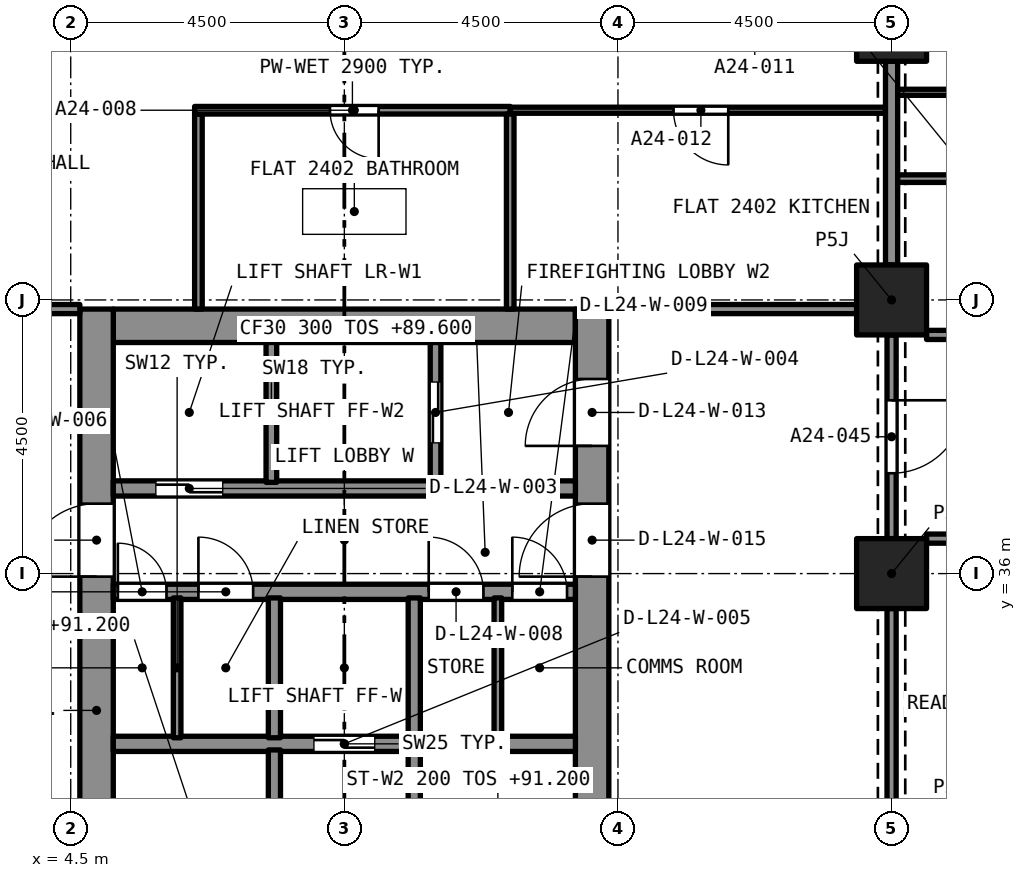
"""IFC4 building model, lengths in metres.
Left out: names, types, materials, properties, quantities, classifications, styles, units other than length and angle.
Written with IfcOpenShell. Run it as: python <this file> out.ifc"""

import sys

from ifc_helpers import new_model, si_unit, direction, frame, frame_2d, origin, origin_2d, place, context, subcontext, project, spatial, rectangle, extrude, element, fill, save


model = new_model("IFC4")
c1 = context("Model", 3, precision=1e-05, world=origin(), true_north=direction((0.0, 1.0)))
c2 = subcontext(c1, "Body", "Model", "MODEL_VIEW")
j1 = project(units=[si_unit("LENGTHUNIT", "METRE"), si_unit("PLANEANGLEUNIT", "RADIAN")], contexts=[c1])
p1 = place(None, origin())
s1 = spatial("IfcSite", under=j1, at=p1, CompositionType="ELEMENT")
p2 = place(p1, origin())
s2 = spatial("IfcBuilding", under=s1, at=p2, CompositionType="ELEMENT")
p3 = place(p2, frame((0.0, 0.0, 89.6)))
s3 = spatial("IfcBuildingStorey", under=s2, at=p3, CompositionType="ELEMENT", Elevation=89.6)
for number, where, z_axis, x_axis in (
    (1, (18.0, 36.0, 0.0), (0.0, 0.0, 1.0), (1.0, 0.0, 0.0)),
    (2, (18.0, 40.5, 0.0), (0.0, 0.0, 1.0), (1.0, 0.0, 0.0)),
    (3, (18.0, 45.0, 0.0), (0.0, 0.0, 1.0), (1.0, 0.0, 0.0)),
):
    element("IfcColumn", number, at=place(p3, frame(where, z_axis=z_axis, x_axis=x_axis)), inside=s3, PredefinedType="COLUMN", context=c2, shape_type="SweptSolid", body=[
        extrude(rectangle(XDim=1.15, YDim=1.15, at=origin_2d()), origin(), (0.0, 0.0, 1.0), 3.2),
    ])
p4 = place(p3, frame((5.2, 40.075, 0.0), z_axis=(0.0, 0.0, 1.0), x_axis=(1.0, 0.0, 0.0)))
e4 = element("IfcWall", 4, at=p4, inside=s3, PredefinedType="SOLIDWALL", context=c2, shape_type="SweptSolid", body=[
    extrude(rectangle(XDim=7.6, YDim=0.55, at=frame_2d((3.8, 0.0))), origin(), (0.0, 0.0, 1.0), 3.2),
])
p5 = place(p3, frame((4.925, 27.15, 0.0), z_axis=(0.0, 0.0, 1.0), x_axis=(0.0, 1.0, 0.0)))
e5 = element("IfcWall", 5, at=p5, inside=s3, PredefinedType="SOLIDWALL", context=c2, shape_type="SweptSolid", body=[
    extrude(rectangle(XDim=13.2, YDim=0.55, at=frame_2d((6.6, 0.0))), origin(), (0.0, 0.0, 1.0), 3.2),
])
p6 = place(p5, frame((8.8, 0.0, 0.0)))
e6 = element("IfcOpeningElement", 6, at=p6, cuts=e5, PredefinedType="OPENING", context=c2, shape_type="SweptSolid", body=[
    extrude(rectangle(XDim=1.2, YDim=2.1, at=frame_2d((0.6, 1.05))), frame((0.0, 0.285, 0.0), z_axis=(0.0, -1.0, 0.0), x_axis=(1.0, 0.0, 0.0)), (0.0, 0.0, 1.0), 0.57),
])
p7 = place(p3, frame((13.075, 27.15, 0.0), z_axis=(0.0, 0.0, 1.0), x_axis=(0.0, 1.0, 0.0)))
e7 = element("IfcWall", 7, at=p7, inside=s3, PredefinedType="SOLIDWALL", context=c2, shape_type="SweptSolid", body=[
    extrude(rectangle(XDim=13.2, YDim=0.55, at=frame_2d((6.6, 0.0))), origin(), (0.0, 0.0, 1.0), 3.2),
])
p8 = place(p7, frame((10.95, 0.0, 0.0)))
e8 = element("IfcOpeningElement", 8, at=p8, cuts=e7, PredefinedType="OPENING", context=c2, shape_type="SweptSolid", body=[
    extrude(rectangle(XDim=1.1, YDim=2.1, at=frame_2d((0.55, 1.05))), frame((0.0, 0.285, 0.0), z_axis=(0.0, -1.0, 0.0), x_axis=(1.0, 0.0, 0.0)), (0.0, 0.0, 1.0), 0.57),
])
p9 = place(p7, frame((8.8, 0.0, 0.0)))
e9 = element("IfcOpeningElement", 9, at=p9, cuts=e7, PredefinedType="OPENING", context=c2, shape_type="SweptSolid", body=[
    extrude(rectangle(XDim=1.2, YDim=2.1, at=frame_2d((0.6, 1.05))), frame((0.0, 0.285, 0.0), z_axis=(0.0, -1.0, 0.0), x_axis=(1.0, 0.0, 0.0)), (0.0, 0.0, 1.0), 0.57),
])
p10 = place(p3, frame((6.6, 40.35, 0.0), z_axis=(0.0, 0.0, 1.0), x_axis=(0.0, 1.0, 0.0)))
e10 = element("IfcWall", 10, at=p10, inside=s3, PredefinedType="PARTITIONING", context=c2, shape_type="SweptSolid", body=[
    extrude(rectangle(XDim=3.208, YDim=0.125, at=frame_2d((1.604, 0.0))), origin(), (0.0, 0.0, 1.0), 2.9),
])
p11 = place(p3, frame((11.728, 43.62, 0.0), z_axis=(0.0, 0.0, 1.0), x_axis=(-1.0, 0.0, 0.0)))
e11 = element("IfcWall", 11, at=p11, inside=s3, PredefinedType="PARTITIONING", context=c2, shape_type="SweptSolid", body=[
    extrude(rectangle(XDim=5.19, YDim=0.125, at=frame_2d((2.595, 0.0))), origin(), (0.0, 0.0, 1.0), 2.9),
])
p12 = place(p11, frame((2.164, 0.0, 0.0)))
e12 = element("IfcOpeningElement", 12, at=p12, cuts=e11, PredefinedType="OPENING", context=c2, shape_type="SweptSolid", body=[
    extrude(rectangle(XDim=0.8, YDim=2.1, at=frame_2d((0.4, 1.05))), frame((0.0, 0.073, 0.0), z_axis=(0.0, -1.0, 0.0), x_axis=(1.0, 0.0, 0.0)), (0.0, 0.0, 1.0), 0.145),
])
p13 = place(p3, frame((11.728, 40.35, 0.0), z_axis=(0.0, 0.0, 1.0), x_axis=(0.0, 1.0, 0.0)))
e13 = element("IfcWall", 13, at=p13, inside=s3, PredefinedType="PARTITIONING", context=c2, shape_type="SweptSolid", body=[
    extrude(rectangle(XDim=3.208, YDim=0.125, at=frame_2d((1.604, 0.0))), origin(), (0.0, 0.0, 1.0), 2.9),
])
p14 = place(p3, frame((17.9, 43.62, 0.0), z_axis=(0.0, 0.0, 1.0), x_axis=(-1.0, 0.0, 0.0)))
e14 = element("IfcWall", 14, at=p14, inside=s3, PredefinedType="PARTITIONING", context=c2, shape_type="SweptSolid", body=[
    extrude(rectangle(XDim=6.172, YDim=0.1, at=frame_2d((3.086, 0.0))), origin(), (0.0, 0.0, 1.0), 2.9),
])
p15 = place(p14, frame((2.586, 0.0, 0.0)))
e15 = element("IfcOpeningElement", 15, at=p15, cuts=e14, PredefinedType="OPENING", context=c2, shape_type="SweptSolid", body=[
    extrude(rectangle(XDim=0.9, YDim=2.1, at=frame_2d((0.45, 1.05))), frame((0.0, 0.06, 0.0), z_axis=(0.0, -1.0, 0.0), x_axis=(1.0, 0.0, 0.0)), (0.0, 0.0, 1.0), 0.12),
])
p16 = place(p3, frame((0.575, 40.35, 0.0), z_axis=(0.0, 0.0, 1.0), x_axis=(1.0, 0.0, 0.0)))
e16 = element("IfcWall", 16, at=p16, inside=s3, PredefinedType="PARTITIONING", context=c2, shape_type="SweptSolid", body=[
    extrude(rectangle(XDim=4.075, YDim=0.15, at=frame_2d((2.038, 0.0))), origin(), (0.0, 0.0, 1.0), 2.9),
])
p17 = place(p16, frame((1.175, 0.0, 0.0)))
e17 = element("IfcOpeningElement", 17, at=p17, cuts=e16, PredefinedType="OPENING", context=c2, shape_type="SweptSolid", body=[
    extrude(rectangle(XDim=1.0, YDim=2.1, at=frame_2d((0.5, 1.05))), frame((0.0, 0.085, 0.0), z_axis=(0.0, -1.0, 0.0), x_axis=(1.0, 0.0, 0.0)), (0.0, 0.0, 1.0), 0.17),
])
p18 = place(p3, frame((18.0, 41.075, 0.0), z_axis=(0.0, 0.0, 1.0), x_axis=(0.0, 1.0, 0.0)))
e18 = element("IfcWall", 18, at=p18, inside=s3, PredefinedType="PARTITIONING", context=c2, shape_type="SweptSolid", body=[
    extrude(rectangle(XDim=3.35, YDim=0.2, at=frame_2d((1.675, 0.0))), origin(), (0.0, 0.0, 1.0), 2.38),
])
p19 = place(p3, frame((13.35, 40.35, 0.0), z_axis=(0.0, 0.0, 1.0), x_axis=(1.0, 0.0, 0.0)))
e19 = element("IfcWall", 19, at=p19, inside=s3, PredefinedType="PARTITIONING", context=c2, shape_type="SweptSolid", body=[
    extrude(rectangle(XDim=4.075, YDim=0.15, at=frame_2d((2.038, 0.0))), origin(), (0.0, 0.0, 1.0), 2.9),
])
p20 = place(p3, frame((20.762, 42.495, 0.0), z_axis=(0.0, 0.0, 1.0), x_axis=(-1.0, 0.0, 0.0)))
e20 = element("IfcWall", 20, at=p20, inside=s3, PredefinedType="PARTITIONING", context=c2, shape_type="SweptSolid", body=[
    extrude(rectangle(XDim=2.662, YDim=0.125, at=frame_2d((1.331, 0.0))), origin(), (0.0, 0.0, 1.0), 2.75),
])
p21 = place(p20, frame((1.012, 0.0, 0.0)))
e21 = element("IfcOpeningElement", 21, at=p21, cuts=e20, PredefinedType="OPENING", context=c2, shape_type="SweptSolid", body=[
    extrude(rectangle(XDim=0.8, YDim=2.1, at=frame_2d((0.4, 1.05))), frame((0.0, 0.073, 0.0), z_axis=(0.0, -1.0, 0.0), x_axis=(1.0, 0.0, 0.0)), (0.0, 0.0, 1.0), 0.145),
])
p22 = place(p3, frame((18.575, 39.925, 0.0), z_axis=(0.0, 0.0, 1.0), x_axis=(1.0, 0.0, 0.0)))
e22 = element("IfcWall", 22, at=p22, inside=s3, PredefinedType="PARTITIONING", context=c2, shape_type="SweptSolid", body=[
    extrude(rectangle(XDim=2.125, YDim=0.15, at=frame_2d((1.062, 0.0))), origin(), (0.0, 0.0, 1.0), 2.75),
])
p23 = place(p3, frame((18.1, 43.915, 0.0), z_axis=(0.0, 0.0, 1.0), x_axis=(1.0, 0.0, 0.0)))
e23 = element("IfcWall", 23, at=p23, inside=s3, PredefinedType="PARTITIONING", context=c2, shape_type="SweptSolid", body=[
    extrude(rectangle(XDim=4.4, YDim=0.1, at=frame_2d((2.2, 0.0))), origin(), (0.0, 0.0, 1.0), 2.75),
])
p24 = place(p23, frame((1.65, 0.0, 0.0)))
e24 = element("IfcOpeningElement", 24, at=p24, cuts=e23, PredefinedType="OPENING", context=c2, shape_type="SweptSolid", body=[
    extrude(rectangle(XDim=1.0, YDim=2.1, at=frame_2d((0.5, 1.05))), frame((0.0, 0.06, 0.0), z_axis=(0.0, -1.0, 0.0), x_axis=(1.0, 0.0, 0.0)), (0.0, 0.0, 1.0), 0.12),
])
p25 = place(p3, frame((22.5, 36.575, 0.0), z_axis=(0.0, 0.0, 1.0), x_axis=(-1.0, 0.0, 0.0)))
e25 = element("IfcWall", 25, at=p25, inside=s3, PredefinedType="PARTITIONING", context=c2, shape_type="SweptSolid", body=[
    extrude(rectangle(XDim=3.925, YDim=0.15, at=frame_2d((1.962, 0.0))), origin(), (0.0, 0.0, 1.0), 2.75),
])
p26 = place(p25, frame((1.75, 0.0, 0.0)))
e26 = element("IfcOpeningElement", 26, at=p26, cuts=e25, PredefinedType="OPENING", context=c2, shape_type="SweptSolid", body=[
    extrude(rectangle(XDim=1.0, YDim=2.1, at=frame_2d((0.5, 1.05))), frame((0.0, 0.085, 0.0), z_axis=(0.0, -1.0, 0.0), x_axis=(1.0, 0.0, 0.0)), (0.0, 0.0, 1.0), 0.17),
])
p27 = place(p3, frame((18.0, 39.925, 0.0), z_axis=(0.0, 0.0, 1.0), x_axis=(0.0, -1.0, 0.0)))
e27 = element("IfcWall", 27, at=p27, inside=s3, PredefinedType="PARTITIONING", context=c2, shape_type="SweptSolid", body=[
    extrude(rectangle(XDim=3.35, YDim=0.15, at=frame_2d((1.675, 0.0))), origin(), (0.0, 0.0, 1.0), 2.38),
])
p28 = place(p27, frame((1.075, 0.0, 0.0)))
e28 = element("IfcOpeningElement", 28, at=p28, cuts=e27, PredefinedType="OPENING", context=c2, shape_type="SweptSolid", body=[
    extrude(rectangle(XDim=1.2, YDim=2.1, at=frame_2d((0.6, 1.05))), frame((0.0, 0.085, 0.0), z_axis=(0.0, -1.0, 0.0), x_axis=(1.0, 0.0, 0.0)), (0.0, 0.0, 1.0), 0.17),
])
p29 = place(p3, frame((18.0, 32.075, 0.0), z_axis=(0.0, 0.0, 1.0), x_axis=(0.0, 1.0, 0.0)))
e29 = element("IfcWall", 29, at=p29, inside=s3, PredefinedType="PARTITIONING", context=c2, shape_type="SweptSolid", body=[
    extrude(rectangle(XDim=3.35, YDim=0.15, at=frame_2d((1.675, 0.0))), origin(), (0.0, 0.0, 1.0), 2.38),
])
p30 = place(p3, frame((5.2, 33.2, 0.0), z_axis=(0.0, 0.0, 1.0), x_axis=(1.0, 0.0, 0.0)))
e30 = element("IfcWall", 30, at=p30, inside=s3, PredefinedType="SOLIDWALL", context=c2, shape_type="SweptSolid", body=[
    extrude(rectangle(XDim=7.6, YDim=0.25, at=frame_2d((3.8, 0.0))), origin(), (0.0, 0.0, 1.0), 2.9),
])
p31 = place(p30, frame((3.3, 0.0, 0.0)))
e31 = element("IfcOpeningElement", 31, at=p31, cuts=e30, PredefinedType="OPENING", context=c2, shape_type="SweptSolid", body=[
    extrude(rectangle(XDim=1.0, YDim=2.1, at=frame_2d((0.5, 1.05))), frame((0.0, 0.135, 0.0), z_axis=(0.0, -1.0, 0.0), x_axis=(1.0, 0.0, 0.0)), (0.0, 0.0, 1.0), 0.27),
])
p32 = place(p3, frame((5.2, 35.7, 0.0), z_axis=(0.0, 0.0, 1.0), x_axis=(1.0, 0.0, 0.0)))
e32 = element("IfcWall", 32, at=p32, inside=s3, PredefinedType="SOLIDWALL", context=c2, shape_type="SweptSolid", body=[
    extrude(rectangle(XDim=7.6, YDim=0.25, at=frame_2d((3.8, 0.0))), origin(), (0.0, 0.0, 1.0), 2.9),
])
p33 = place(p32, frame((0.075, 0.0, 0.0)))
e33 = element("IfcOpeningElement", 33, at=p33, cuts=e32, PredefinedType="OPENING", context=c2, shape_type="SweptSolid", body=[
    extrude(rectangle(XDim=0.8, YDim=2.1, at=frame_2d((0.4, 1.05))), frame((0.0, 0.135, 0.0), z_axis=(0.0, -1.0, 0.0), x_axis=(1.0, 0.0, 0.0)), (0.0, 0.0, 1.0), 0.27),
])
p34 = place(p32, frame((1.4, 0.0, 0.0)))
e34 = element("IfcOpeningElement", 34, at=p34, cuts=e32, PredefinedType="OPENING", context=c2, shape_type="SweptSolid", body=[
    extrude(rectangle(XDim=0.9, YDim=2.1, at=frame_2d((0.45, 1.05))), frame((0.0, 0.135, 0.0), z_axis=(0.0, -1.0, 0.0), x_axis=(1.0, 0.0, 0.0)), (0.0, 0.0, 1.0), 0.27),
])
p35 = place(p32, frame((5.188, 0.0, 0.0)))
e35 = element("IfcOpeningElement", 35, at=p35, cuts=e32, PredefinedType="OPENING", context=c2, shape_type="SweptSolid", body=[
    extrude(rectangle(XDim=0.9, YDim=2.1, at=frame_2d((0.45, 1.05))), frame((0.0, 0.135, 0.0), z_axis=(0.0, -1.0, 0.0), x_axis=(1.0, 0.0, 0.0)), (0.0, 0.0, 1.0), 0.27),
])
p36 = place(p32, frame((6.562, 0.0, 0.0)))
e36 = element("IfcOpeningElement", 36, at=p36, cuts=e32, PredefinedType="OPENING", context=c2, shape_type="SweptSolid", body=[
    extrude(rectangle(XDim=0.9, YDim=2.1, at=frame_2d((0.45, 1.05))), frame((0.0, 0.135, 0.0), z_axis=(0.0, -1.0, 0.0), x_axis=(1.0, 0.0, 0.0)), (0.0, 0.0, 1.0), 0.27),
])
p37 = place(p3, frame((5.2, 37.4, 0.0), z_axis=(0.0, 0.0, 1.0), x_axis=(1.0, 0.0, 0.0)))
e37 = element("IfcWall", 37, at=p37, inside=s3, PredefinedType="SOLIDWALL", context=c2, shape_type="SweptSolid", body=[
    extrude(rectangle(XDim=7.6, YDim=0.25, at=frame_2d((3.8, 0.0))), origin(), (0.0, 0.0, 1.0), 2.9),
])
p38 = place(p37, frame((0.7, 0.0, 0.0)))
e38 = element("IfcOpeningElement", 38, at=p38, cuts=e37, PredefinedType="OPENING", context=c2, shape_type="SweptSolid", body=[
    extrude(rectangle(XDim=1.1, YDim=2.4, at=frame_2d((0.55, 1.2))), frame((0.0, 0.135, 0.0), z_axis=(0.0, -1.0, 0.0), x_axis=(1.0, 0.0, 0.0)), (0.0, 0.0, 1.0), 0.27),
])
p39 = place(p3, frame((7.85, 27.7, 0.0), z_axis=(0.0, 0.0, 1.0), x_axis=(0.0, 1.0, 0.0)))
e39 = element("IfcWall", 39, at=p39, inside=s3, PredefinedType="SOLIDWALL", context=c2, shape_type="SweptSolid", body=[
    extrude(rectangle(XDim=5.4, YDim=0.2, at=frame_2d((2.7, 0.0))), origin(), (0.0, 0.0, 1.0), 2.9),
])
p40 = place(p39, frame((0.2, 0.0, 0.0)))
e40 = element("IfcOpeningElement", 40, at=p40, cuts=e39, PredefinedType="OPENING", context=c2, shape_type="SweptSolid", body=[
    extrude(rectangle(XDim=0.9, YDim=2.1, at=frame_2d((0.45, 1.05))), frame((0.0, 0.11, 0.0), z_axis=(0.0, -1.0, 0.0), x_axis=(1.0, 0.0, 0.0)), (0.0, 0.0, 1.0), 0.22),
])
p41 = place(p3, frame((10.15, 27.7, 0.0), z_axis=(0.0, 0.0, 1.0), x_axis=(0.0, 1.0, 0.0)))
e41 = element("IfcWall", 41, at=p41, inside=s3, PredefinedType="SOLIDWALL", context=c2, shape_type="SweptSolid", body=[
    extrude(rectangle(XDim=5.4, YDim=0.2, at=frame_2d((2.7, 0.0))), origin(), (0.0, 0.0, 1.0), 2.9),
])
p42 = place(p41, frame((0.2, 0.0, 0.0)))
e42 = element("IfcOpeningElement", 42, at=p42, cuts=e41, PredefinedType="OPENING", context=c2, shape_type="SweptSolid", body=[
    extrude(rectangle(XDim=0.9, YDim=2.1, at=frame_2d((0.45, 1.05))), frame((0.0, 0.11, 0.0), z_axis=(0.0, -1.0, 0.0), x_axis=(1.0, 0.0, 0.0)), (0.0, 0.0, 1.0), 0.22),
])
for number, where, z_axis, x_axis in (
    (43, (7.85, 33.3, 0.0), (0.0, 0.0, 1.0), (0.0, 1.0, 0.0)),
    (44, (10.15, 33.3, 0.0), (0.0, 0.0, 1.0), (0.0, 1.0, 0.0)),
):
    element("IfcWall", number, at=place(p3, frame(where, z_axis=z_axis, x_axis=x_axis)), inside=s3, PredefinedType="SOLIDWALL", context=c2, shape_type="SweptSolid", body=[
        extrude(rectangle(XDim=2.3, YDim=0.2, at=frame_2d((1.15, 0.0))), origin(), (0.0, 0.0, 1.0), 2.9),
    ])
p43 = place(p3, frame((7.8, 37.5, 0.0), z_axis=(0.0, 0.0, 1.0), x_axis=(0.0, 1.0, 0.0)))
e45 = element("IfcWall", 45, at=p43, inside=s3, PredefinedType="SOLIDWALL", context=c2, shape_type="SweptSolid", body=[
    extrude(rectangle(XDim=2.3, YDim=0.175, at=frame_2d((1.15, 0.0))), origin(), (0.0, 0.0, 1.0), 2.9),
])
p44 = place(p3, frame((10.5, 37.5, 0.0), z_axis=(0.0, 0.0, 1.0), x_axis=(0.0, 1.0, 0.0)))
e46 = element("IfcWall", 46, at=p44, inside=s3, PredefinedType="SOLIDWALL", context=c2, shape_type="SweptSolid", body=[
    extrude(rectangle(XDim=2.3, YDim=0.175, at=frame_2d((1.15, 0.0))), origin(), (0.0, 0.0, 1.0), 2.9),
])
p45 = place(p44, frame((0.65, 0.0, 0.0)))
e47 = element("IfcOpeningElement", 47, at=p45, cuts=e46, PredefinedType="OPENING", context=c2, shape_type="SweptSolid", body=[
    extrude(rectangle(XDim=1.0, YDim=2.1, at=frame_2d((0.5, 1.05))), frame((0.0, 0.097, 0.0), z_axis=(0.0, -1.0, 0.0), x_axis=(1.0, 0.0, 0.0)), (0.0, 0.0, 1.0), 0.195),
])
for number, where, z_axis, x_axis in (
    (48, (6.25, 33.3, 0.0), (0.0, 0.0, 1.0), (0.0, 1.0, 0.0)),
    (49, (11.525, 33.3, 0.0), (0.0, 0.0, 1.0), (0.0, 1.0, 0.0)),
):
    element("IfcWall", number, at=place(p3, frame(where, z_axis=z_axis, x_axis=x_axis)), inside=s3, PredefinedType="PARTITIONING", context=c2, shape_type="SweptSolid", body=[
        extrude(rectangle(XDim=2.3, YDim=0.125, at=frame_2d((1.15, 0.0))), origin(), (0.0, 0.0, 1.0), 2.9),
    ])
p46 = place(p12, origin())
e50 = element("IfcDoor", 50, at=p46, inside=s3, OperationType="SINGLE_SWING_LEFT", PredefinedType="DOOR", context=c2, shape_type="SweptSolid", body=[
    extrude(rectangle(XDim=0.8, YDim=2.1, at=frame_2d((0.4, 1.05))), frame((0.0, 0.025, 0.0), z_axis=(0.0, -1.0, 0.0), x_axis=(1.0, 0.0, 0.0)), (0.0, 0.0, 1.0), 0.05),
])
fill(e12, e50)
p47 = place(p15, origin())
e51 = element("IfcDoor", 51, at=p47, inside=s3, OperationType="SINGLE_SWING_LEFT", PredefinedType="DOOR", context=c2, shape_type="SweptSolid", body=[
    extrude(rectangle(XDim=0.9, YDim=2.1, at=frame_2d((0.45, 1.05))), frame((0.0, 0.025, 0.0), z_axis=(0.0, -1.0, 0.0), x_axis=(1.0, 0.0, 0.0)), (0.0, 0.0, 1.0), 0.05),
])
fill(e15, e51)
p48 = place(p28, origin())
e52 = element("IfcDoor", 52, at=p48, inside=s3, OperationType="SINGLE_SWING_LEFT", PredefinedType="DOOR", context=c2, shape_type="SweptSolid", body=[
    extrude(rectangle(XDim=1.2, YDim=2.1, at=frame_2d((0.6, 1.05))), frame((0.0, 0.025, 0.0), z_axis=(0.0, -1.0, 0.0), x_axis=(1.0, 0.0, 0.0)), (0.0, 0.0, 1.0), 0.05),
])
fill(e28, e52)
p49 = place(p38, origin())
e53 = element("IfcDoor", 53, at=p49, inside=s3, OperationType="SLIDING_TO_LEFT", PredefinedType="DOOR", context=c2, shape_type="SweptSolid", body=[
    extrude(rectangle(XDim=1.1, YDim=2.4, at=frame_2d((0.55, 1.2))), frame((0.0, 0.025, 0.0), z_axis=(0.0, -1.0, 0.0), x_axis=(1.0, 0.0, 0.0)), (0.0, 0.0, 1.0), 0.05),
])
fill(e38, e53)
p50 = place(p45, origin())
e54 = element("IfcDoor", 54, at=p50, inside=s3, OperationType="SLIDING_TO_LEFT", PredefinedType="DOOR", context=c2, shape_type="SweptSolid", body=[
    extrude(rectangle(XDim=1.0, YDim=2.1, at=frame_2d((0.5, 1.05))), frame((0.0, 0.025, 0.0), z_axis=(0.0, -1.0, 0.0), x_axis=(1.0, 0.0, 0.0)), (0.0, 0.0, 1.0), 0.05),
])
fill(e47, e54)
p51 = place(p31, origin())
e55 = element("IfcDoor", 55, at=p51, inside=s3, OperationType="SLIDING_TO_LEFT", PredefinedType="DOOR", context=c2, shape_type="SweptSolid", body=[
    extrude(rectangle(XDim=1.0, YDim=2.1, at=frame_2d((0.5, 1.05))), frame((0.0, 0.025, 0.0), z_axis=(0.0, -1.0, 0.0), x_axis=(1.0, 0.0, 0.0)), (0.0, 0.0, 1.0), 0.05),
])
fill(e31, e55)
p52 = place(p33, origin())
e56 = element("IfcDoor", 56, at=p52, inside=s3, OperationType="SINGLE_SWING_LEFT", PredefinedType="DOOR", context=c2, shape_type="SweptSolid", body=[
    extrude(rectangle(XDim=0.8, YDim=2.1, at=frame_2d((0.4, 1.05))), frame((0.0, 0.025, 0.0), z_axis=(0.0, -1.0, 0.0), x_axis=(1.0, 0.0, 0.0)), (0.0, 0.0, 1.0), 0.05),
])
fill(e33, e56)
p53 = place(p34, origin())
e57 = element("IfcDoor", 57, at=p53, inside=s3, OperationType="SINGLE_SWING_LEFT", PredefinedType="DOOR", context=c2, shape_type="SweptSolid", body=[
    extrude(rectangle(XDim=0.9, YDim=2.1, at=frame_2d((0.45, 1.05))), frame((0.0, 0.025, 0.0), z_axis=(0.0, -1.0, 0.0), x_axis=(1.0, 0.0, 0.0)), (0.0, 0.0, 1.0), 0.05),
])
fill(e34, e57)
p54 = place(p35, origin())
e58 = element("IfcDoor", 58, at=p54, inside=s3, OperationType="SINGLE_SWING_LEFT", PredefinedType="DOOR", context=c2, shape_type="SweptSolid", body=[
    extrude(rectangle(XDim=0.9, YDim=2.1, at=frame_2d((0.45, 1.05))), frame((0.0, 0.025, 0.0), z_axis=(0.0, -1.0, 0.0), x_axis=(1.0, 0.0, 0.0)), (0.0, 0.0, 1.0), 0.05),
])
fill(e35, e58)
p55 = place(p36, origin())
e59 = element("IfcDoor", 59, at=p55, inside=s3, OperationType="SINGLE_SWING_LEFT", PredefinedType="DOOR", context=c2, shape_type="SweptSolid", body=[
    extrude(rectangle(XDim=0.9, YDim=2.1, at=frame_2d((0.45, 1.05))), frame((0.0, 0.025, 0.0), z_axis=(0.0, -1.0, 0.0), x_axis=(1.0, 0.0, 0.0)), (0.0, 0.0, 1.0), 0.05),
])
fill(e36, e59)
p56 = place(p8, origin())
e60 = element("IfcDoor", 60, at=p56, inside=s3, OperationType="SINGLE_SWING_LEFT", PredefinedType="DOOR", context=c2, shape_type="SweptSolid", body=[
    extrude(rectangle(XDim=1.1, YDim=2.1, at=frame_2d((0.55, 1.05))), frame((0.0, 0.025, 0.0), z_axis=(0.0, -1.0, 0.0), x_axis=(1.0, 0.0, 0.0)), (0.0, 0.0, 1.0), 0.05),
])
fill(e8, e60)
p57 = place(p6, origin())
e61 = element("IfcDoor", 61, at=p57, inside=s3, OperationType="SINGLE_SWING_LEFT", PredefinedType="DOOR", context=c2, shape_type="SweptSolid", body=[
    extrude(rectangle(XDim=1.2, YDim=2.1, at=frame_2d((0.6, 1.05))), frame((0.0, 0.025, 0.0), z_axis=(0.0, -1.0, 0.0), x_axis=(1.0, 0.0, 0.0)), (0.0, 0.0, 1.0), 0.05),
])
fill(e6, e61)
p58 = place(p9, origin())
e62 = element("IfcDoor", 62, at=p58, inside=s3, OperationType="SINGLE_SWING_LEFT", PredefinedType="DOOR", context=c2, shape_type="SweptSolid", body=[
    extrude(rectangle(XDim=1.2, YDim=2.1, at=frame_2d((0.6, 1.05))), frame((0.0, 0.025, 0.0), z_axis=(0.0, -1.0, 0.0), x_axis=(1.0, 0.0, 0.0)), (0.0, 0.0, 1.0), 0.05),
])
fill(e9, e62)
save(model, sys.argv[1])
